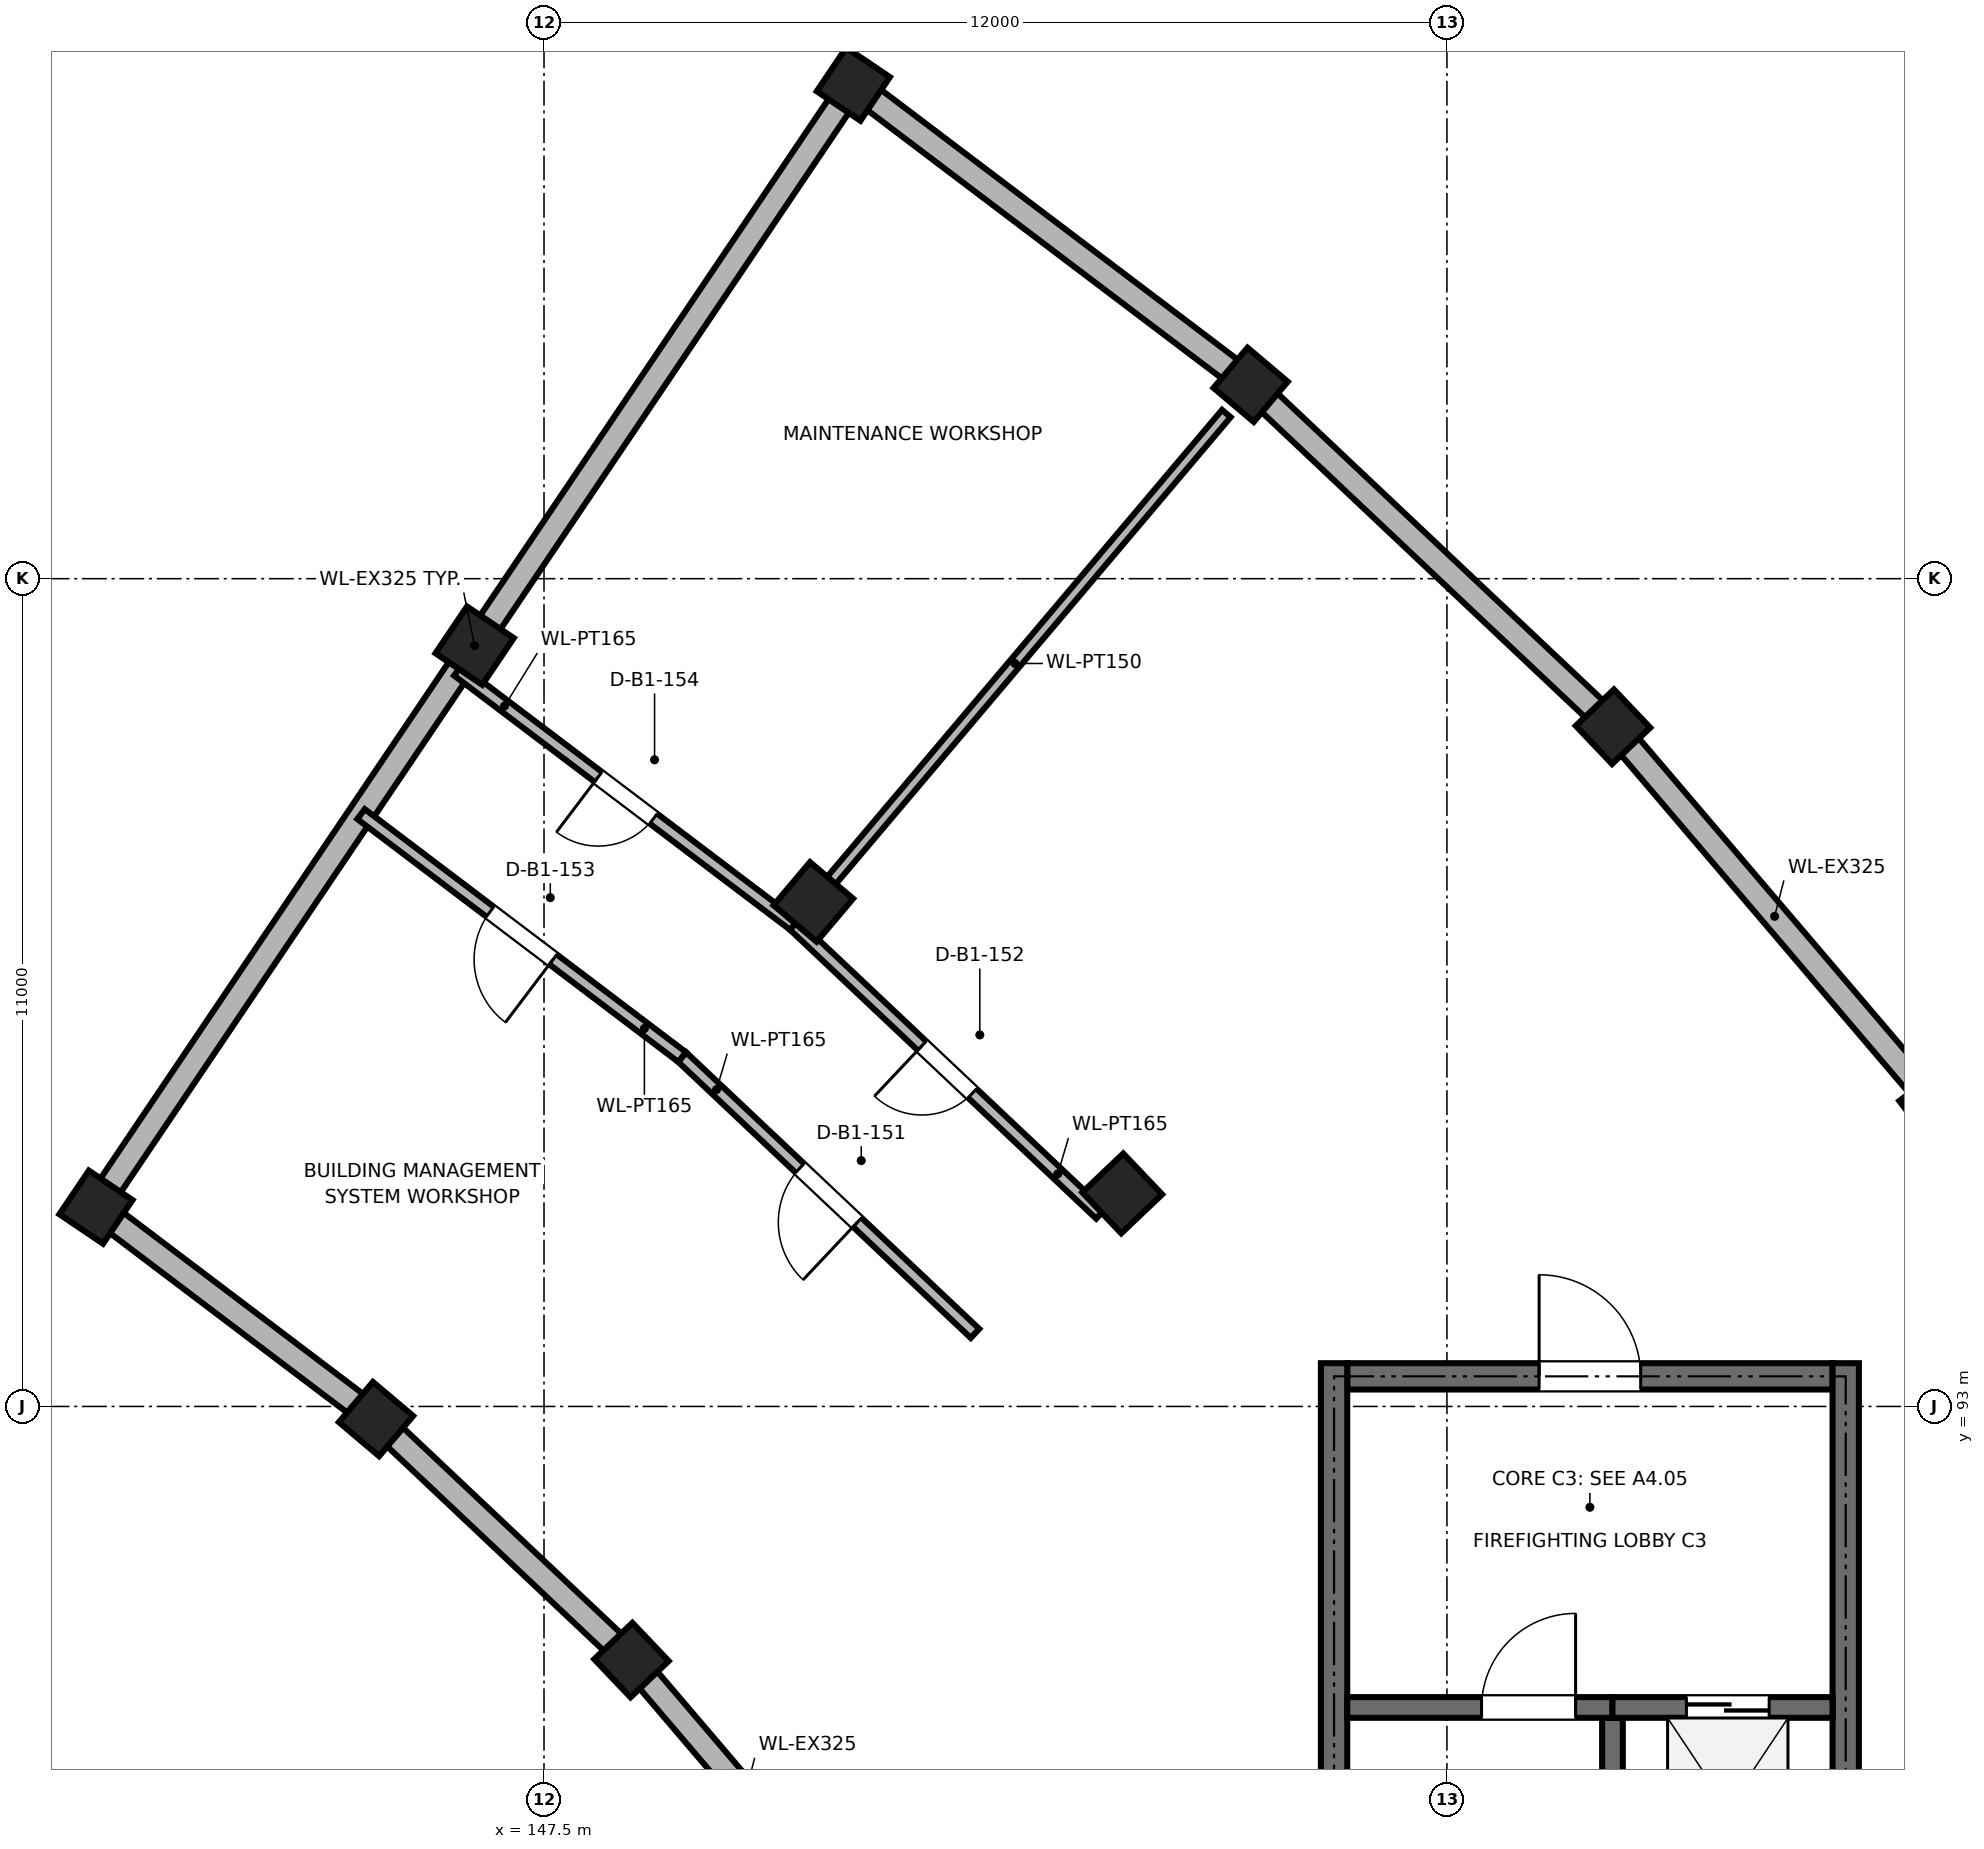
"""IFC4 building model, lengths in metres.
Left out: names, types, materials, properties, quantities, classifications, styles, units other than length and angle.
Written with IfcOpenShell. Run it as: python <this file> out.ifc"""

import sys

from ifc_helpers import new_model, si_unit, direction, frame, frame_2d, origin, origin_2d, place, context, subcontext, project, spatial, rectangle, extrude, element, fill, save


model = new_model("IFC4")
c1 = context("Model", 3, precision=1e-05, world=origin(), true_north=direction((0.0, 1.0)))
c2 = subcontext(c1, "Body", "Model", "MODEL_VIEW")
j1 = project(units=[si_unit("LENGTHUNIT", "METRE"), si_unit("PLANEANGLEUNIT", "RADIAN")], contexts=[c1])
p1 = place(None, origin())
s1 = spatial("IfcSite", under=j1, at=p1, CompositionType="ELEMENT")
p2 = place(p1, origin())
s2 = spatial("IfcBuilding", under=s1, at=p2, CompositionType="ELEMENT")
p3 = place(p2, frame((0.0, 0.0, -4.8)))
s3 = spatial("IfcBuildingStorey", under=s2, at=p3, CompositionType="ELEMENT", Elevation=-4.8)
for number, where, z_axis, x_axis in (
    (1, (166.002, 96.993, 0.0), (0.0, 0.0, 1.0), (0.795, 0.606, 0.0)),
    (2, (148.662, 89.629, 0.0), (0.0, 0.0, 1.0), (0.725, 0.689, 0.0)),
):
    element("IfcColumn", number, at=place(p3, frame(where, z_axis=z_axis, x_axis=x_axis)), inside=s3, PredefinedType="COLUMN", context=c2, shape_type="SweptSolid", body=[
        extrude(rectangle(XDim=0.7, YDim=0.7, at=origin_2d()), origin(), (0.0, 0.0, 1.0), 4.8),
    ])
p4 = place(p3, frame((155.185, 95.831, 0.0), z_axis=(0.0, 0.0, 1.0), x_axis=(0.724653130187, 0.689113808387, 0.0)))
e3 = element("IfcColumn", 3, at=p4, inside=s3, PredefinedType="COLUMN", context=c2, shape_type="SweptSolid", body=[
    extrude(rectangle(XDim=0.75, YDim=0.75, at=origin_2d()), origin(), (0.0, 0.0, 1.0), 4.8),
])
for number, where, z_axis, x_axis in (
    (4, (161.707, 102.032, 0.0), (0.0, 0.0, 1.0), (0.725, 0.689, 0.0)),
    (5, (145.267, 92.833, 0.0), (0.0, 0.0, 1.0), (0.646, 0.764, 0.0)),
):
    element("IfcColumn", number, at=place(p3, frame(where, z_axis=z_axis, x_axis=x_axis)), inside=s3, PredefinedType="COLUMN", context=c2, shape_type="SweptSolid", body=[
        extrude(rectangle(XDim=0.7, YDim=0.7, at=origin_2d()), origin(), (0.0, 0.0, 1.0), 4.8),
    ])
p5 = place(p3, frame((151.079, 99.704, 0.0), z_axis=(0.0, 0.0, 1.0), x_axis=(0.645724263505, 0.763570674869, 0.0)))
e6 = element("IfcColumn", 6, at=p5, inside=s3, PredefinedType="COLUMN", context=c2, shape_type="SweptSolid", body=[
    extrude(rectangle(XDim=0.75, YDim=0.75, at=origin_2d()), origin(), (0.0, 0.0, 1.0), 4.8),
])
for number, where, z_axis, x_axis in (
    (7, (156.891, 106.576, 0.0), (0.0, 0.0, 1.0), (0.646, 0.764, 0.0)),
    (8, (141.545, 95.649, 0.0), (0.0, 0.0, 1.0), (0.559, 0.829, 0.0)),
):
    element("IfcColumn", number, at=place(p3, frame(where, z_axis=z_axis, x_axis=x_axis)), inside=s3, PredefinedType="COLUMN", context=c2, shape_type="SweptSolid", body=[
        extrude(rectangle(XDim=0.7, YDim=0.7, at=origin_2d()), origin(), (0.0, 0.0, 1.0), 4.8),
    ])
p6 = place(p3, frame((146.578, 103.11, 0.0), z_axis=(0.0, 0.0, 1.0), x_axis=(0.559192903471, 0.829037572555, 0.0)))
e9 = element("IfcColumn", 9, at=p6, inside=s3, PredefinedType="COLUMN", context=c2, shape_type="SweptSolid", body=[
    extrude(rectangle(XDim=0.75, YDim=0.75, at=origin_2d()), origin(), (0.0, 0.0, 1.0), 4.8),
])
p7 = place(p3, frame((151.611, 110.571, 0.0), z_axis=(0.0, 0.0, 1.0), x_axis=(0.559192903471, 0.829037572555, 0.0)))
e10 = element("IfcColumn", 10, at=p7, inside=s3, PredefinedType="COLUMN", context=c2, shape_type="SweptSolid", body=[
    extrude(rectangle(XDim=0.7, YDim=0.7, at=origin_2d()), origin(), (0.0, 0.0, 1.0), 4.8),
])
p8 = place(p3, frame((151.677, 86.093, 0.0), z_axis=(0.0, 0.0, 1.0), x_axis=(-0.648712136454, 0.761033878363, 0.0)))
e11 = element("IfcWall", 11, at=p8, inside=s3, PredefinedType="SOLIDWALL", context=c2, shape_type="SweptSolid", body=[
    extrude(rectangle(XDim=4.627, YDim=0.325, at=frame_2d((2.314, 0.0))), origin(), (0.0, 0.0, 1.0), 3.738),
])
p9 = place(p3, frame((161.72, 102.017, 0.0), z_axis=(0.0, 0.0, 1.0), x_axis=(0.648708464949, -0.761037007973, 0.0)))
e12 = element("IfcWall", 12, at=p9, inside=s3, PredefinedType="SOLIDWALL", context=c2, shape_type="SweptSolid", body=[
    extrude(rectangle(XDim=6.581, YDim=0.325, at=frame_2d((3.291, 0.0))), origin(), (0.0, 0.0, 1.0), 3.738),
])
p10 = place(p3, frame((148.648, 89.643, 0.0), z_axis=(0.0, 0.0, 1.0), x_axis=(-0.727383217963, 0.686231487346, 0.0)))
e13 = element("IfcWall", 13, at=p10, inside=s3, PredefinedType="SOLIDWALL", context=c2, shape_type="SweptSolid", body=[
    extrude(rectangle(XDim=4.627, YDim=0.325, at=frame_2d((2.314, 0.0))), origin(), (0.0, 0.0, 1.0), 3.738),
])
p11 = place(p3, frame((156.906, 106.562, 0.0), z_axis=(0.0, 0.0, 1.0), x_axis=(0.727377231984, -0.686237832235, 0.0)))
e14 = element("IfcWall", 14, at=p11, inside=s3, PredefinedType="SOLIDWALL", context=c2, shape_type="SweptSolid", body=[
    extrude(rectangle(XDim=6.581, YDim=0.325, at=frame_2d((3.291, 0.0))), origin(), (0.0, 0.0, 1.0), 3.738),
])
p12 = place(p3, frame((145.251, 92.844, 0.0), z_axis=(0.0, 0.0, 1.0), x_axis=(-0.797466762723, 0.603362877837, 0.0)))
e15 = element("IfcWall", 15, at=p12, inside=s3, PredefinedType="SOLIDWALL", context=c2, shape_type="SweptSolid", body=[
    extrude(rectangle(XDim=4.627, YDim=0.325, at=frame_2d((2.314, 0.0))), origin(), (0.0, 0.0, 1.0), 3.738),
])
p13 = place(p3, frame((151.627, 110.559, 0.0), z_axis=(0.0, 0.0, 1.0), x_axis=(0.797477783019, -0.603348311998, 0.0)))
e16 = element("IfcWall", 16, at=p13, inside=s3, PredefinedType="SOLIDWALL", context=c2, shape_type="SweptSolid", body=[
    extrude(rectangle(XDim=6.581, YDim=0.325, at=frame_2d((3.291, 0.0))), origin(), (0.0, 0.0, 1.0), 3.738),
])
p14 = place(p3, frame((141.556, 95.665, 0.0), z_axis=(0.0, 0.0, 1.0), x_axis=(0.559199902081, 0.82903285189, 0.0)))
e17 = element("IfcWall", 17, at=p14, inside=s3, PredefinedType="SOLIDWALL", context=c2, shape_type="SweptSolid", body=[
    extrude(rectangle(XDim=17.96, YDim=0.325, at=frame_2d((8.98, 0.0))), origin(), (0.0, 0.0, 1.0), 3.738),
])
p15 = place(p3, frame((158.175, 93.4, 0.0), z_axis=(0.0, 0.0, 1.0), x_axis=(1.0, 0.0, 0.0)))
e18 = element("IfcWall", 18, at=p15, inside=s3, PredefinedType="SHEAR", context=c2, shape_type="SweptSolid", body=[
    extrude(rectangle(XDim=6.45, YDim=0.35, at=frame_2d((3.225, 0.0))), origin(), (0.0, 0.0, 1.0), 4.5),
])
p16 = place(p15, frame((2.55, 0.0, 0.0)))
e19 = element("IfcOpeningElement", 19, at=p16, cuts=e18, PredefinedType="OPENING", context=c2, shape_type="SweptSolid", body=[
    extrude(rectangle(XDim=1.35, YDim=2.2, at=frame_2d((0.675, 1.1))), frame((0.0, 0.185, 0.0), z_axis=(0.0, -1.0, 0.0), x_axis=(1.0, 0.0, 0.0)), (0.0, 0.0, 1.0), 0.37),
])
for number, where, z_axis, x_axis in (
    (20, (158.0, 81.975, 0.0), (0.0, 0.0, 1.0), (0.0, 1.0, 0.0)),
    (21, (164.8, 81.975, 0.0), (0.0, 0.0, 1.0), (0.0, 1.0, 0.0)),
):
    element("IfcWall", number, at=place(p3, frame(where, z_axis=z_axis, x_axis=x_axis)), inside=s3, PredefinedType="SHEAR", context=c2, shape_type="SweptSolid", body=[
        extrude(rectangle(XDim=11.6, YDim=0.35, at=frame_2d((5.8, 0.0))), origin(), (0.0, 0.0, 1.0), 4.5),
    ])
p17 = place(p3, frame((161.7, 81.975, 0.0), z_axis=(0.0, 0.0, 1.0), x_axis=(0.0, 1.0, 0.0)))
e22 = element("IfcWall", 22, at=p17, inside=s3, PredefinedType="SHEAR", context=c2, shape_type="SweptSolid", body=[
    extrude(rectangle(XDim=6.887, YDim=0.275, at=frame_2d((3.444, 0.0))), origin(), (0.0, 0.0, 1.0), 4.5),
])
p18 = place(p3, frame((158.175, 89.0, 0.0), z_axis=(0.0, 0.0, 1.0), x_axis=(1.0, 0.0, 0.0)))
e23 = element("IfcWall", 23, at=p18, inside=s3, PredefinedType="SHEAR", context=c2, shape_type="SweptSolid", body=[
    extrude(rectangle(XDim=3.525, YDim=0.275, at=frame_2d((1.762, 0.0))), origin(), (0.0, 0.0, 1.0), 4.5),
])
p19 = place(p18, frame((1.785, 0.0, 0.0)))
e24 = element("IfcOpeningElement", 24, at=p19, cuts=e23, PredefinedType="OPENING", context=c2, shape_type="SweptSolid", body=[
    extrude(rectangle(XDim=1.25, YDim=2.15, at=frame_2d((0.625, 1.075))), frame((0.0, 0.147, 0.0), z_axis=(0.0, -1.0, 0.0), x_axis=(1.0, 0.0, 0.0)), (0.0, 0.0, 1.0), 0.295),
])
p20 = place(p3, frame((161.7, 89.0, 0.0), z_axis=(0.0, 0.0, 1.0), x_axis=(1.0, 0.0, 0.0)))
e25 = element("IfcWall", 25, at=p20, inside=s3, PredefinedType="SHEAR", context=c2, shape_type="SweptSolid", body=[
    extrude(rectangle(XDim=2.925, YDim=0.275, at=frame_2d((1.462, 0.0))), origin(), (0.0, 0.0, 1.0), 4.5),
])
p21 = place(p20, frame((0.982, 0.0, 0.0)))
e26 = element("IfcOpeningElement", 26, at=p21, cuts=e25, PredefinedType="OPENING", context=c2, shape_type="SweptSolid", body=[
    extrude(rectangle(XDim=1.1, YDim=2.15, at=frame_2d((0.55, 1.075))), frame((0.0, 0.147, 0.0), z_axis=(0.0, -1.0, 0.0), x_axis=(1.0, 0.0, 0.0)), (0.0, 0.0, 1.0), 0.295),
])
p22 = place(p3, frame((153.228, 93.97, 0.0), z_axis=(0.0, 0.0, 1.0), x_axis=(-0.7273609966, 0.68625504051, 0.0)))
e27 = element("IfcWall", 27, at=p22, inside=s3, PredefinedType="PARTITIONING", context=c2, shape_type="SweptSolid", body=[
    extrude(rectangle(XDim=5.351, YDim=0.165, at=frame_2d((2.676, 0.0))), origin(), (0.0, 0.0, 1.0), 3.74),
])
p23 = place(p22, frame((2.151, 0.0, 0.0)))
e28 = element("IfcOpeningElement", 28, at=p23, cuts=e27, PredefinedType="OPENING", context=c2, shape_type="SweptSolid", body=[
    extrude(rectangle(XDim=1.05, YDim=2.15, at=frame_2d((0.525, 1.075))), frame((0.0, 0.093, 0.0), z_axis=(0.0, -1.0, 0.0), x_axis=(1.0, 0.0, 0.0)), (0.0, 0.0, 1.0), 0.185),
])
p24 = place(p3, frame((154.895, 95.555, 0.0), z_axis=(0.0, 0.0, 1.0), x_axis=(-0.727402273239, 0.686211288807, 0.0)))
e29 = element("IfcWall", 29, at=p24, inside=s3, PredefinedType="PARTITIONING", context=c2, shape_type="SweptSolid", body=[
    extrude(rectangle(XDim=5.601, YDim=0.165, at=frame_2d((2.801, 0.0))), origin(), (0.0, 0.0, 1.0), 3.74),
])
p25 = place(p24, frame((2.341, 0.0, 0.0)))
e30 = element("IfcOpeningElement", 30, at=p25, cuts=e29, PredefinedType="OPENING", context=c2, shape_type="SweptSolid", body=[
    extrude(rectangle(XDim=0.92, YDim=2.1, at=frame_2d((0.46, 1.05))), frame((0.0, 0.093, 0.0), z_axis=(0.0, -1.0, 0.0), x_axis=(1.0, 0.0, 0.0)), (0.0, 0.0, 1.0), 0.185),
])
p26 = place(p3, frame((149.336, 97.643, 0.0), z_axis=(0.0, 0.0, 1.0), x_axis=(-0.797474612376, 0.603352502784, 0.0)))
e31 = element("IfcWall", 31, at=p26, inside=s3, PredefinedType="PARTITIONING", context=c2, shape_type="SweptSolid", body=[
    extrude(rectangle(XDim=5.351, YDim=0.165, at=frame_2d((2.676, 0.0))), origin(), (0.0, 0.0, 1.0), 3.74),
])
p27 = place(p26, frame((2.151, 0.0, 0.0)))
e32 = element("IfcOpeningElement", 32, at=p27, cuts=e31, PredefinedType="OPENING", context=c2, shape_type="SweptSolid", body=[
    extrude(rectangle(XDim=1.05, YDim=2.15, at=frame_2d((0.525, 1.075))), frame((0.0, 0.093, 0.0), z_axis=(0.0, -1.0, 0.0), x_axis=(1.0, 0.0, 0.0)), (0.0, 0.0, 1.0), 0.185),
])
p28 = place(p3, frame((150.821, 99.399, 0.0), z_axis=(0.0, 0.0, 1.0), x_axis=(-0.797450601932, 0.603384237015, 0.0)))
e33 = element("IfcWall", 33, at=p28, inside=s3, PredefinedType="PARTITIONING", context=c2, shape_type="SweptSolid", body=[
    extrude(rectangle(XDim=5.601, YDim=0.165, at=frame_2d((2.8, 0.0))), origin(), (0.0, 0.0, 1.0), 3.74),
])
p29 = place(p28, frame((2.34, 0.0, 0.0)))
e34 = element("IfcOpeningElement", 34, at=p29, cuts=e33, PredefinedType="OPENING", context=c2, shape_type="SweptSolid", body=[
    extrude(rectangle(XDim=0.92, YDim=2.1, at=frame_2d((0.46, 1.05))), frame((0.0, 0.093, 0.0), z_axis=(0.0, -1.0, 0.0), x_axis=(1.0, 0.0, 0.0)), (0.0, 0.0, 1.0), 0.185),
])
p30 = place(p3, frame((150.95, 99.552, 0.0), z_axis=(0.0, 0.0, 1.0), x_axis=(0.645745976221, 0.763552312677, 0.0)))
e35 = element("IfcWall", 35, at=p30, inside=s3, PredefinedType="PARTITIONING", context=c2, shape_type="SweptSolid", body=[
    extrude(rectangle(XDim=8.7, YDim=0.15, at=frame_2d((4.35, 0.0))), origin(), (0.0, 0.0, 1.0), 3.74),
])
p31 = place(p19, origin())
e36 = element("IfcDoor", 36, at=p31, inside=s3, OperationType="SINGLE_SWING_RIGHT", PredefinedType="DOOR", context=c2, shape_type="SweptSolid", body=[
    extrude(rectangle(XDim=1.25, YDim=2.15, at=frame_2d((0.625, 1.075))), frame((0.0, 0.025, 0.0), z_axis=(0.0, -1.0, 0.0), x_axis=(1.0, 0.0, 0.0)), (0.0, 0.0, 1.0), 0.05),
])
fill(e24, e36)
p32 = place(p21, origin())
e37 = element("IfcDoor", 37, at=p32, inside=s3, OperationType="DOUBLE_DOOR_SLIDING", PredefinedType="DOOR", context=c2, shape_type="SweptSolid", body=[
    extrude(rectangle(XDim=1.1, YDim=2.15, at=frame_2d((0.55, 1.075))), frame((0.0, 0.025, 0.0), z_axis=(0.0, -1.0, 0.0), x_axis=(1.0, 0.0, 0.0)), (0.0, 0.0, 1.0), 0.05),
])
fill(e26, e37)
p33 = place(p16, origin())
e38 = element("IfcDoor", 38, at=p33, inside=s3, OperationType="SINGLE_SWING_LEFT", PredefinedType="DOOR", context=c2, shape_type="SweptSolid", body=[
    extrude(rectangle(XDim=1.35, YDim=2.2, at=frame_2d((0.675, 1.1))), frame((0.0, 0.025, 0.0), z_axis=(0.0, -1.0, 0.0), x_axis=(1.0, 0.0, 0.0)), (0.0, 0.0, 1.0), 0.05),
])
fill(e19, e38)
p34 = place(p23, origin())
e39 = element("IfcDoor", 39, at=p34, inside=s3, OperationType="SINGLE_SWING_LEFT", PredefinedType="DOOR", context=c2, shape_type="SweptSolid", body=[
    extrude(rectangle(XDim=1.05, YDim=2.15, at=frame_2d((0.525, 1.075))), frame((0.0, 0.025, 0.0), z_axis=(0.0, -1.0, 0.0), x_axis=(1.0, 0.0, 0.0)), (0.0, 0.0, 1.0), 0.05),
])
fill(e28, e39)
p35 = place(p25, origin())
e40 = element("IfcDoor", 40, at=p35, inside=s3, OperationType="SINGLE_SWING_RIGHT", PredefinedType="DOOR", context=c2, shape_type="SweptSolid", body=[
    extrude(rectangle(XDim=0.92, YDim=2.1, at=frame_2d((0.46, 1.05))), frame((0.0, 0.025, 0.0), z_axis=(0.0, -1.0, 0.0), x_axis=(1.0, 0.0, 0.0)), (0.0, 0.0, 1.0), 0.05),
])
fill(e30, e40)
p36 = place(p27, origin())
e41 = element("IfcDoor", 41, at=p36, inside=s3, OperationType="SINGLE_SWING_LEFT", PredefinedType="DOOR", context=c2, shape_type="SweptSolid", body=[
    extrude(rectangle(XDim=1.05, YDim=2.15, at=frame_2d((0.525, 1.075))), frame((0.0, 0.025, 0.0), z_axis=(0.0, -1.0, 0.0), x_axis=(1.0, 0.0, 0.0)), (0.0, 0.0, 1.0), 0.05),
])
fill(e32, e41)
p37 = place(p29, origin())
e42 = element("IfcDoor", 42, at=p37, inside=s3, OperationType="SINGLE_SWING_RIGHT", PredefinedType="DOOR", context=c2, shape_type="SweptSolid", body=[
    extrude(rectangle(XDim=0.92, YDim=2.1, at=frame_2d((0.46, 1.05))), frame((0.0, 0.025, 0.0), z_axis=(0.0, -1.0, 0.0), x_axis=(1.0, 0.0, 0.0)), (0.0, 0.0, 1.0), 0.05),
])
fill(e34, e42)
save(model, sys.argv[1])
